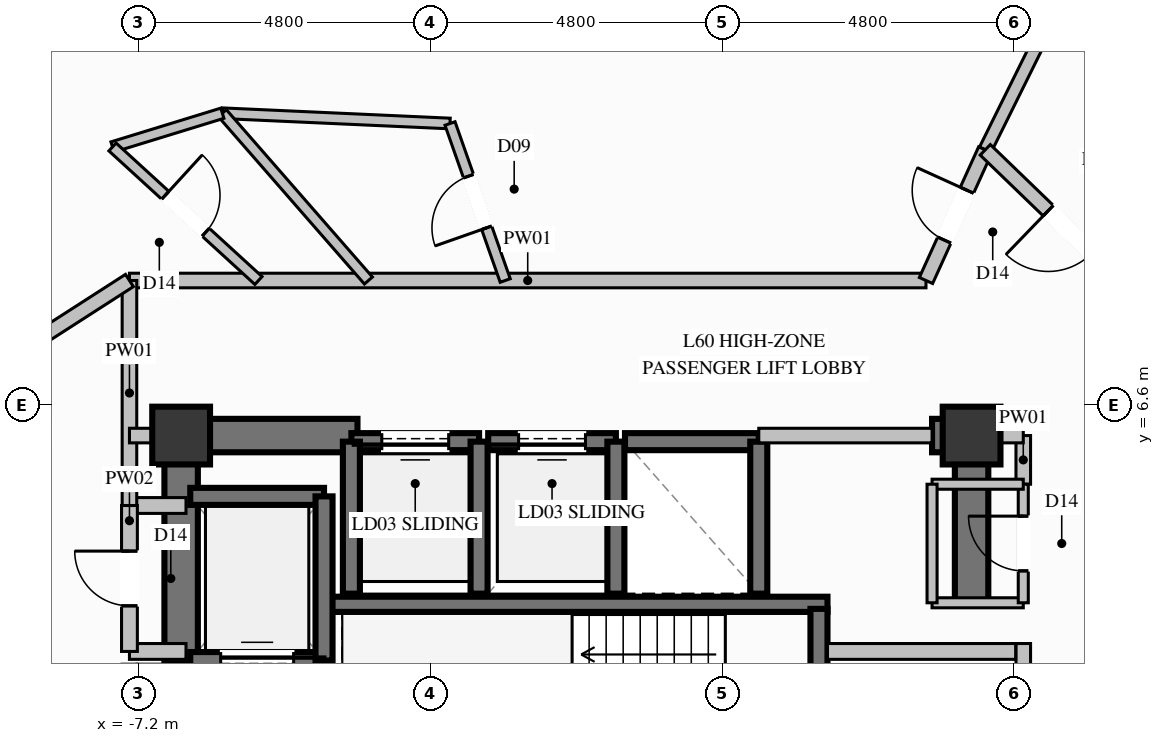
"""IFC4 building model, lengths in metres.
Left out: names, types, materials, properties, quantities, classifications, styles, units other than length and angle.
Written with IfcOpenShell. Run it as: python <this file> out.ifc"""

import sys

from ifc_helpers import new_model, si_unit, direction, frame, frame_2d, origin, origin_2d, place, context, subcontext, project, spatial, rectangle, extrude, element, fill, save


model = new_model("IFC4")
c1 = context("Model", 3, precision=1e-05, world=origin(), true_north=direction((0.0, 1.0)))
c2 = subcontext(c1, "Body", "Model", "MODEL_VIEW")
j1 = project(units=[si_unit("LENGTHUNIT", "METRE"), si_unit("PLANEANGLEUNIT", "RADIAN")], contexts=[c1])
p1 = place(None, origin())
s1 = spatial("IfcSite", under=j1, at=p1, CompositionType="ELEMENT")
p2 = place(p1, origin())
s2 = spatial("IfcBuilding", under=s1, at=p2, CompositionType="ELEMENT")
p3 = place(p2, frame((0.0, 0.0, 230.8)))
s3 = spatial("IfcBuildingStorey", under=s2, at=p3, CompositionType="ELEMENT", Elevation=230.8)
for number, where, z_axis, x_axis in (
    (1, (6.5, 6.1, 0.0), (0.0, 0.0, 1.0), (1.0, 0.0, 0.0)),
    (2, (-6.5, 6.1, 0.0), (0.0, 0.0, 1.0), (1.0, 0.0, 0.0)),
):
    element("IfcColumn", number, at=place(p3, frame(where, z_axis=z_axis, x_axis=x_axis)), inside=s3, PredefinedType="COLUMN", context=c2, shape_type="SweptSolid", body=[
        extrude(rectangle(XDim=0.95, YDim=0.95, at=origin_2d()), origin(), (0.0, 0.0, 1.0), 3.6),
    ])
p4 = place(p3, frame((-4.13, 3.325, 0.0), z_axis=(0.0, 0.0, 1.0), x_axis=(1.0, 0.0, 0.0)))
e3 = element("IfcWall", 3, at=p4, inside=s3, PredefinedType="SOLIDWALL", context=c2, shape_type="SweptSolid", body=[
    extrude(rectangle(XDim=8.26, YDim=0.25, at=frame_2d((4.13, 0.0))), origin(), (0.0, 0.0, 1.0), 3.6),
])
p5 = place(p3, frame((-6.225, 6.1, 0.0), z_axis=(0.0, 0.0, 1.0), x_axis=(1.0, 0.0, 0.0)))
e4 = element("IfcWall", 4, at=p5, inside=s3, PredefinedType="SHEAR", context=c2, shape_type="SweptSolid", body=[
    extrude(rectangle(XDim=2.625, YDim=0.55, at=frame_2d((1.312, 0.0))), origin(), (0.0, 0.0, 1.0), 3.6),
])
p6 = place(p3, frame((5.85, 6.1, 0.0), z_axis=(0.0, 0.0, 1.0), x_axis=(1.0, 0.0, 0.0)))
e5 = element("IfcWall", 5, at=p6, inside=s3, PredefinedType="SHEAR", context=c2, shape_type="SweptSolid", body=[
    extrude(rectangle(XDim=0.375, YDim=0.55, at=frame_2d((0.188, 0.0))), origin(), (0.0, 0.0, 1.0), 3.6),
])
p7 = place(p3, frame((-6.5, 2.35, 0.0), z_axis=(0.0, 0.0, 1.0), x_axis=(0.0, 1.0, 0.0)))
e6 = element("IfcWall", 6, at=p7, inside=s3, PredefinedType="SHEAR", context=c2, shape_type="SweptSolid", body=[
    extrude(rectangle(XDim=4.025, YDim=0.55, at=frame_2d((2.012, 0.0))), origin(), (0.0, 0.0, 1.0), 3.6),
])
p8 = place(p3, frame((6.5, 3.35, 0.0), z_axis=(0.0, 0.0, 1.0), x_axis=(0.0, 1.0, 0.0)))
e7 = element("IfcWall", 7, at=p8, inside=s3, PredefinedType="SHEAR", context=c2, shape_type="SweptSolid", body=[
    extrude(rectangle(XDim=3.025, YDim=0.55, at=frame_2d((1.512, 0.0))), origin(), (0.0, 0.0, 1.0), 3.6),
])
p9 = place(p3, frame((-1.6, 6.0, 0.0), z_axis=(0.0, 0.0, 1.0), x_axis=(-1.0, 0.0, 0.0)))
e8 = element("IfcWall", 8, at=p9, inside=s3, PredefinedType="SOLIDWALL", context=c2, shape_type="SweptSolid", body=[
    extrude(rectangle(XDim=2.1, YDim=0.28, at=frame_2d((1.05, 0.0))), origin(), (0.0, 0.0, 1.0), 3.2),
])
p10 = place(p9, frame((0.5, 0.0, 0.0)))
e9 = element("IfcOpeningElement", 9, at=p10, cuts=e8, PredefinedType="OPENING", context=c2, shape_type="SweptSolid", body=[
    extrude(rectangle(XDim=1.1, YDim=2.02, at=frame_2d((0.55, 1.01))), frame((0.0, 0.15, 0.0), z_axis=(0.0, -1.0, 0.0), x_axis=(1.0, 0.0, 0.0)), (0.0, 0.0, 1.0), 0.3),
])
for number, where, z_axis, x_axis in (
    (10, (-3.7, 6.0, 0.0), (0.0, 0.0, 1.0), (0.0, -1.0, 0.0)),
    (11, (-1.6, 3.5, 0.0), (0.0, 0.0, 1.0), (0.0, 1.0, 0.0)),
):
    element("IfcWall", number, at=place(p3, frame(where, z_axis=z_axis, x_axis=x_axis)), inside=s3, PredefinedType="SOLIDWALL", context=c2, shape_type="SweptSolid", body=[
        extrude(rectangle(XDim=2.5, YDim=0.28, at=frame_2d((1.25, 0.0))), origin(), (0.0, 0.0, 1.0), 3.2),
    ])
p11 = place(p3, frame((0.65, 6.0, 0.0), z_axis=(0.0, 0.0, 1.0), x_axis=(-1.0, 0.0, 0.0)))
e12 = element("IfcWall", 12, at=p11, inside=s3, PredefinedType="SOLIDWALL", context=c2, shape_type="SweptSolid", body=[
    extrude(rectangle(XDim=2.1, YDim=0.28, at=frame_2d((1.05, 0.0))), origin(), (0.0, 0.0, 1.0), 3.2),
])
p12 = place(p11, frame((0.5, 0.0, 0.0)))
e13 = element("IfcOpeningElement", 13, at=p12, cuts=e12, PredefinedType="OPENING", context=c2, shape_type="SweptSolid", body=[
    extrude(rectangle(XDim=1.1, YDim=2.02, at=frame_2d((0.55, 1.01))), frame((0.0, 0.15, 0.0), z_axis=(0.0, -1.0, 0.0), x_axis=(1.0, 0.0, 0.0)), (0.0, 0.0, 1.0), 0.3),
])
p13 = place(p3, frame((0.65, 3.5, 0.0), z_axis=(0.0, 0.0, 1.0), x_axis=(0.0, 1.0, 0.0)))
e14 = element("IfcWall", 14, at=p13, inside=s3, PredefinedType="SOLIDWALL", context=c2, shape_type="SweptSolid", body=[
    extrude(rectangle(XDim=2.5, YDim=0.28, at=frame_2d((1.25, 0.0))), origin(), (0.0, 0.0, 1.0), 3.2),
])
p14 = place(p3, frame((3.0, 6.0, 0.0), z_axis=(0.0, 0.0, 1.0), x_axis=(-1.0, 0.0, 0.0)))
e15 = element("IfcWall", 15, at=p14, inside=s3, PredefinedType="SOLIDWALL", context=c2, shape_type="SweptSolid", body=[
    extrude(rectangle(XDim=2.2, YDim=0.28, at=frame_2d((1.1, 0.0))), origin(), (0.0, 0.0, 1.0), 3.2),
])
p15 = place(p3, frame((3.0, 3.5, 0.0), z_axis=(0.0, 0.0, 1.0), x_axis=(0.0, 1.0, 0.0)))
e16 = element("IfcWall", 16, at=p15, inside=s3, PredefinedType="SOLIDWALL", context=c2, shape_type="SweptSolid", body=[
    extrude(rectangle(XDim=2.5, YDim=0.28, at=frame_2d((1.25, 0.0))), origin(), (0.0, 0.0, 1.0), 3.2),
])
p16 = place(p3, frame((-6.35, 2.4, 0.0), z_axis=(0.0, 0.0, 1.0), x_axis=(1.0, 0.0, 0.0)))
e17 = element("IfcWall", 17, at=p16, inside=s3, PredefinedType="SOLIDWALL", context=c2, shape_type="SweptSolid", body=[
    extrude(rectangle(XDim=2.2, YDim=0.28, at=frame_2d((1.1, 0.0))), origin(), (0.0, 0.0, 1.0), 3.2),
])
p17 = place(p16, frame((0.5, 0.0, 0.0)))
e18 = element("IfcOpeningElement", 18, at=p17, cuts=e17, PredefinedType="OPENING", context=c2, shape_type="SweptSolid", body=[
    extrude(rectangle(XDim=1.2, YDim=2.2, at=frame_2d((0.6, 1.1))), frame((0.0, 0.15, 0.0), z_axis=(0.0, -1.0, 0.0), x_axis=(1.0, 0.0, 0.0)), (0.0, 0.0, 1.0), 0.3),
])
p18 = place(p3, frame((-4.15, 5.1, 0.0), z_axis=(0.0, 0.0, 1.0), x_axis=(-1.0, 0.0, 0.0)))
e19 = element("IfcWall", 19, at=p18, inside=s3, PredefinedType="SOLIDWALL", context=c2, shape_type="SweptSolid", body=[
    extrude(rectangle(XDim=2.2, YDim=0.28, at=frame_2d((1.1, 0.0))), origin(), (0.0, 0.0, 1.0), 3.2),
])
p19 = place(p3, frame((-4.15, 2.4, 0.0), z_axis=(0.0, 0.0, 1.0), x_axis=(0.0, 1.0, 0.0)))
e20 = element("IfcWall", 20, at=p19, inside=s3, PredefinedType="SOLIDWALL", context=c2, shape_type="SweptSolid", body=[
    extrude(rectangle(XDim=2.7, YDim=0.28, at=frame_2d((1.35, 0.0))), origin(), (0.0, 0.0, 1.0), 3.2),
])
p20 = place(p3, frame((3.99, -2.21, 0.0), z_axis=(0.0, 0.0, 1.0), x_axis=(0.0, 1.0, 0.0)))
e21 = element("IfcWall", 21, at=p20, inside=s3, PredefinedType="SOLIDWALL", context=c2, shape_type="SweptSolid", body=[
    extrude(rectangle(XDim=5.46, YDim=0.28, at=frame_2d((2.73, 0.0))), origin(), (0.0, 0.0, 1.0), 3.2),
])
p21 = place(p20, frame((3.323, 0.0, 0.0)))
e22 = element("IfcOpeningElement", 22, at=p21, cuts=e21, PredefinedType="OPENING", context=c2, shape_type="SweptSolid", body=[
    extrude(rectangle(XDim=1.2, YDim=2.2, at=frame_2d((0.6, 1.1))), frame((0.0, 0.15, 0.0), z_axis=(0.0, -1.0, 0.0), x_axis=(1.0, 0.0, 0.0)), (0.0, 0.0, 1.0), 0.3),
])
p22 = place(p3, frame((7.35, -2.34, 0.0), z_axis=(0.0, 0.0, 1.0), x_axis=(0.0, 1.0, 0.0)))
e23 = element("IfcWall", 23, at=p22, inside=s3, PredefinedType="PARTITIONING", context=c2, shape_type="SweptSolid", body=[
    extrude(rectangle(XDim=5.02, YDim=0.24, at=frame_2d((2.51, 0.0))), origin(), (0.0, 0.0, 1.0), 3.2),
])
p23 = place(p22, frame((2.678, 0.0, 0.0)))
e24 = element("IfcOpeningElement", 24, at=p23, cuts=e23, PredefinedType="OPENING", context=c2, shape_type="SweptSolid", body=[
    extrude(rectangle(XDim=0.9, YDim=2.02, at=frame_2d((0.45, 1.01))), frame((0.0, 0.13, 0.0), z_axis=(0.0, -1.0, 0.0), x_axis=(1.0, 0.0, 0.0)), (0.0, 0.0, 1.0), 0.26),
])
p24 = place(p3, frame((4.13, 2.55, 0.0), z_axis=(0.0, 0.0, 1.0), x_axis=(1.0, 0.0, 0.0)))
e25 = element("IfcWall", 25, at=p24, inside=s3, PredefinedType="PARTITIONING", context=c2, shape_type="SweptSolid", body=[
    extrude(rectangle(XDim=3.095, YDim=0.26, at=frame_2d((1.548, 0.0))), origin(), (0.0, 0.0, 1.0), 3.2),
])
for number, where, z_axis, x_axis in (
    (26, (-7.35, 4.95, 0.0), (0.0, 0.0, 1.0), (1.0, 0.0, 0.0)),
    (27, (-7.35, 2.55, 0.0), (0.0, 0.0, 1.0), (1.0, 0.0, 0.0)),
):
    element("IfcWall", number, at=place(p3, frame(where, z_axis=z_axis, x_axis=x_axis)), inside=s3, PredefinedType="PARTITIONING", context=c2, shape_type="SweptSolid", body=[
        extrude(rectangle(XDim=0.93, YDim=0.26, at=frame_2d((0.465, 0.0))), origin(), (0.0, 0.0, 1.0), 3.2),
    ])
p25 = place(p3, frame((-7.35, 2.55, 0.0), z_axis=(0.0, 0.0, 1.0), x_axis=(0.0, 1.0, 0.0)))
e28 = element("IfcWall", 28, at=p25, inside=s3, PredefinedType="PARTITIONING", context=c2, shape_type="SweptSolid", body=[
    extrude(rectangle(XDim=2.4, YDim=0.26, at=frame_2d((1.2, 0.0))), origin(), (0.0, 0.0, 1.0), 3.2),
])
p26 = place(p25, frame((0.75, 0.0, 0.0)))
e29 = element("IfcOpeningElement", 29, at=p26, cuts=e28, PredefinedType="OPENING", context=c2, shape_type="SweptSolid", body=[
    extrude(rectangle(XDim=0.9, YDim=2.02, at=frame_2d((0.45, 1.01))), frame((0.0, 0.14, 0.0), z_axis=(0.0, -1.0, 0.0), x_axis=(1.0, 0.0, 0.0)), (0.0, 0.0, 1.0), 0.28),
])
p27 = place(p3, frame((-7.35, 8.65, 0.0), z_axis=(0.0, 0.0, 1.0), x_axis=(1.0, 0.0, 0.0)))
e30 = element("IfcWall", 30, at=p27, inside=s3, PredefinedType="PARTITIONING", context=c2, shape_type="SweptSolid", body=[
    extrude(rectangle(XDim=13.1, YDim=0.24, at=frame_2d((6.55, 0.0))), origin(), (0.0, 0.0, 1.0), 3.2),
])
p28 = place(p3, frame((3.0, 6.1, 0.0), z_axis=(0.0, 0.0, 1.0), x_axis=(1.0, 0.0, 0.0)))
e31 = element("IfcWall", 31, at=p28, inside=s3, PredefinedType="PARTITIONING", context=c2, shape_type="SweptSolid", body=[
    extrude(rectangle(XDim=2.85, YDim=0.24, at=frame_2d((1.425, 0.0))), origin(), (0.0, 0.0, 1.0), 2.067),
])
p29 = place(p3, frame((7.35, 5.3, 0.0), z_axis=(0.0, 0.0, 1.0), x_axis=(0.0, 1.0, 0.0)))
e32 = element("IfcWall", 32, at=p29, inside=s3, PredefinedType="PARTITIONING", context=c2, shape_type="SweptSolid", body=[
    extrude(rectangle(XDim=0.8, YDim=0.24, at=frame_2d((0.4, 0.0))), origin(), (0.0, 0.0, 1.0), 3.2),
])
p30 = place(p3, frame((6.5, 6.1, 0.0), z_axis=(0.0, 0.0, 1.0), x_axis=(1.0, 0.0, 0.0)))
e33 = element("IfcWall", 33, at=p30, inside=s3, PredefinedType="PARTITIONING", context=c2, shape_type="SweptSolid", body=[
    extrude(rectangle(XDim=0.85, YDim=0.24, at=frame_2d((0.425, 0.0))), origin(), (0.0, 0.0, 1.0), 3.2),
])
p31 = place(p3, frame((-7.35, 4.95, 0.0), z_axis=(0.0, 0.0, 1.0), x_axis=(0.0, 1.0, 0.0)))
e34 = element("IfcWall", 34, at=p31, inside=s3, PredefinedType="PARTITIONING", context=c2, shape_type="SweptSolid", body=[
    extrude(rectangle(XDim=3.7, YDim=0.24, at=frame_2d((1.85, 0.0))), origin(), (0.0, 0.0, 1.0), 3.2),
])
p32 = place(p3, frame((-7.35, 6.1, 0.0), z_axis=(0.0, 0.0, 1.0), x_axis=(1.0, 0.0, 0.0)))
e35 = element("IfcWall", 35, at=p32, inside=s3, PredefinedType="PARTITIONING", context=c2, shape_type="SweptSolid", body=[
    extrude(rectangle(XDim=0.85, YDim=0.24, at=frame_2d((0.425, 0.0))), origin(), (0.0, 0.0, 1.0), 3.2),
])
p33 = place(p3, frame((5.85, 3.35, 0.0), z_axis=(0.0, 0.0, 1.0), x_axis=(1.0, 0.0, 0.0)))
e36 = element("IfcWall", 36, at=p33, inside=s3, PredefinedType="PARTITIONING", context=c2, shape_type="SweptSolid", body=[
    extrude(rectangle(XDim=1.5, YDim=0.165, at=frame_2d((0.75, 0.0))), origin(), (0.0, 0.0, 1.0), 3.2),
])
p34 = place(p3, frame((7.35, 3.35, 0.0), z_axis=(0.0, 0.0, 1.0), x_axis=(0.0, 1.0, 0.0)))
e37 = element("IfcWall", 37, at=p34, inside=s3, PredefinedType="PARTITIONING", context=c2, shape_type="SweptSolid", body=[
    extrude(rectangle(XDim=1.95, YDim=0.165, at=frame_2d((0.975, 0.0))), origin(), (0.0, 0.0, 1.0), 3.2),
])
p35 = place(p34, frame((0.525, 0.0, 0.0)))
e38 = element("IfcOpeningElement", 38, at=p35, cuts=e37, PredefinedType="OPENING", context=c2, shape_type="SweptSolid", body=[
    extrude(rectangle(XDim=0.9, YDim=2.02, at=frame_2d((0.45, 1.01))), frame((0.0, 0.093, 0.0), z_axis=(0.0, -1.0, 0.0), x_axis=(1.0, 0.0, 0.0)), (0.0, 0.0, 1.0), 0.185),
])
p36 = place(p3, frame((7.35, 5.3, 0.0), z_axis=(0.0, 0.0, 1.0), x_axis=(-1.0, 0.0, 0.0)))
e39 = element("IfcWall", 39, at=p36, inside=s3, PredefinedType="PARTITIONING", context=c2, shape_type="SweptSolid", body=[
    extrude(rectangle(XDim=1.5, YDim=0.165, at=frame_2d((0.75, 0.0))), origin(), (0.0, 0.0, 1.0), 3.2),
])
p37 = place(p3, frame((5.85, 5.3, 0.0), z_axis=(0.0, 0.0, 1.0), x_axis=(0.0, -1.0, 0.0)))
e40 = element("IfcWall", 40, at=p37, inside=s3, PredefinedType="PARTITIONING", context=c2, shape_type="SweptSolid", body=[
    extrude(rectangle(XDim=1.95, YDim=0.165, at=frame_2d((0.975, 0.0))), origin(), (0.0, 0.0, 1.0), 2.067),
])
p38 = place(p3, frame((6.725, 10.799, 0.0), z_axis=(0.0, 0.0, 1.0), x_axis=(0.443620421332, 0.896214774358, 0.0)))
e41 = element("IfcWall", 41, at=p38, inside=s3, PredefinedType="PARTITIONING", context=c2, shape_type="SweptSolid", body=[
    extrude(rectangle(XDim=2.693, YDim=0.21, at=frame_2d((1.347, 0.0))), origin(), (0.0, 0.0, 1.0), 2.067),
])
p39 = place(p3, frame((-5.822, 11.401, 0.0), z_axis=(0.0, 0.0, 1.0), x_axis=(0.99898352798, -0.045076721529, 0.0)))
e42 = element("IfcWall", 42, at=p39, inside=s3, PredefinedType="PLUMBINGWALL", context=c2, shape_type="SweptSolid", body=[
    extrude(rectangle(XDim=3.748, YDim=0.175, at=frame_2d((1.874, 0.0))), origin(), (0.0, 0.0, 1.0), 3.2),
])
p40 = place(p3, frame((-5.822, 11.401, 0.0), z_axis=(0.0, 0.0, 1.0), x_axis=(0.657728098428, -0.753255433793, 0.0)))
e43 = element("IfcWall", 43, at=p40, inside=s3, PredefinedType="PLUMBINGWALL", context=c2, shape_type="SweptSolid", body=[
    extrude(rectangle(XDim=3.652, YDim=0.175, at=frame_2d((1.826, 0.0))), origin(), (0.0, 0.0, 1.0), 2.067),
])
p41 = place(p3, frame((-1.17, 8.65, 0.0), z_axis=(0.0, 0.0, 1.0), x_axis=(-0.33173276109, 0.943373401798, 0.0)))
e44 = element("IfcWall", 44, at=p41, inside=s3, PredefinedType="PLUMBINGWALL", context=c2, shape_type="SweptSolid", body=[
    extrude(rectangle(XDim=2.737, YDim=0.175, at=frame_2d((1.369, 0.0))), origin(), (0.0, 0.0, 1.0), 3.2),
])
p42 = place(p41, frame((0.919, 0.0, 0.0)))
e45 = element("IfcOpeningElement", 45, at=p42, cuts=e44, PredefinedType="OPENING", context=c2, shape_type="SweptSolid", body=[
    extrude(rectangle(XDim=0.9, YDim=2.1, at=frame_2d((0.45, 1.05))), frame((0.0, 0.098, 0.0), z_axis=(0.0, -1.0, 0.0), x_axis=(1.0, 0.0, 0.0)), (0.0, 0.0, 1.0), 0.195),
])
p43 = place(p3, frame((5.75, 8.65, 0.0), z_axis=(0.0, 0.0, 1.0), x_axis=(0.413171528251, 0.910653220629, 0.0)))
e46 = element("IfcWall", 46, at=p43, inside=s3, PredefinedType="PARTITIONING", context=c2, shape_type="SweptSolid", body=[
    extrude(rectangle(XDim=2.36, YDim=0.24, at=frame_2d((1.18, 0.0))), origin(), (0.0, 0.0, 1.0), 2.067),
])
p44 = place(p43, frame((0.73, 0.0, 0.0)))
e47 = element("IfcOpeningElement", 47, at=p44, cuts=e46, PredefinedType="OPENING", context=c2, shape_type="SweptSolid", body=[
    extrude(rectangle(XDim=0.9, YDim=2.02, at=frame_2d((0.45, 1.01))), frame((0.0, 0.13, 0.0), z_axis=(0.0, -1.0, 0.0), x_axis=(1.0, 0.0, 0.0)), (0.0, 0.0, 1.0), 0.26),
])
p45 = place(p3, frame((-7.629, 10.846, 0.0), z_axis=(0.0, 0.0, 1.0), x_axis=(0.955932477138, 0.293586612692, 0.0)))
e48 = element("IfcWall", 48, at=p45, inside=s3, PredefinedType="PLUMBINGWALL", context=c2, shape_type="SweptSolid", body=[
    extrude(rectangle(XDim=1.89, YDim=0.175, at=frame_2d((0.945, 0.0))), origin(), (0.0, 0.0, 1.0), 3.2),
])
p46 = place(p3, frame((-7.629, 10.846, 0.0), z_axis=(0.0, 0.0, 1.0), x_axis=(0.737882530439, -0.674929160189, 0.0)))
e49 = element("IfcWall", 49, at=p46, inside=s3, PredefinedType="PLUMBINGWALL", context=c2, shape_type="SweptSolid", body=[
    extrude(rectangle(XDim=3.254, YDim=0.175, at=frame_2d((1.627, 0.0))), origin(), (0.0, 0.0, 1.0), 2.067),
])
p47 = place(p46, frame((1.177, 0.0, 0.0)))
e50 = element("IfcOpeningElement", 50, at=p47, cuts=e49, PredefinedType="OPENING", context=c2, shape_type="SweptSolid", body=[
    extrude(rectangle(XDim=0.9, YDim=2.02, at=frame_2d((0.45, 1.01))), frame((0.0, 0.098, 0.0), z_axis=(0.0, -1.0, 0.0), x_axis=(1.0, 0.0, 0.0)), (0.0, 0.0, 1.0), 0.195),
])
p48 = place(p3, frame((-11.238, 6.15, 0.0), z_axis=(0.0, 0.0, 1.0), x_axis=(0.841118406986, 0.540851019625, 0.0)))
e51 = element("IfcWall", 51, at=p48, inside=s3, PredefinedType="PARTITIONING", context=c2, shape_type="SweptSolid", body=[
    extrude(rectangle(XDim=4.622, YDim=0.24, at=frame_2d((2.311, 0.0))), origin(), (0.0, 0.0, 1.0), 3.2),
])
p49 = place(p48, frame((1.811, 0.0, 0.0)))
e52 = element("IfcOpeningElement", 52, at=p49, cuts=e51, PredefinedType="OPENING", context=c2, shape_type="SweptSolid", body=[
    extrude(rectangle(XDim=1.0, YDim=2.2, at=frame_2d((0.5, 1.1))), frame((0.0, 0.13, 0.0), z_axis=(0.0, -1.0, 0.0), x_axis=(1.0, 0.0, 0.0)), (0.0, 0.0, 1.0), 0.26),
])
p50 = place(p3, frame((9.517, 8.103, 0.0), z_axis=(0.0, 0.0, 1.0), x_axis=(-0.719359188441, 0.694638292931, 0.0)))
e53 = element("IfcWall", 53, at=p50, inside=s3, PredefinedType="PARTITIONING", context=c2, shape_type="SweptSolid", body=[
    extrude(rectangle(XDim=3.881, YDim=0.24, at=frame_2d((1.94, 0.0))), origin(), (0.0, 0.0, 1.0), 3.2),
])
p51 = place(p50, frame((1.441, 0.0, 0.0)))
e54 = element("IfcOpeningElement", 54, at=p51, cuts=e53, PredefinedType="OPENING", context=c2, shape_type="SweptSolid", body=[
    extrude(rectangle(XDim=1.0, YDim=2.2, at=frame_2d((0.5, 1.1))), frame((0.0, 0.13, 0.0), z_axis=(0.0, -1.0, 0.0), x_axis=(1.0, 0.0, 0.0)), (0.0, 0.0, 1.0), 0.26),
])
p52 = place(p10, origin())
e55 = element("IfcDoor", 55, at=p52, inside=s3, OperationType="SLIDING_TO_LEFT", PredefinedType="DOOR", context=c2, shape_type="SweptSolid", body=[
    extrude(rectangle(XDim=1.1, YDim=2.02, at=frame_2d((0.55, 1.01))), frame((0.0, 0.025, 0.0), z_axis=(0.0, -1.0, 0.0), x_axis=(1.0, 0.0, 0.0)), (0.0, 0.0, 1.0), 0.05),
])
fill(e9, e55)
p53 = place(p12, origin())
e56 = element("IfcDoor", 56, at=p53, inside=s3, OperationType="SLIDING_TO_LEFT", PredefinedType="DOOR", context=c2, shape_type="SweptSolid", body=[
    extrude(rectangle(XDim=1.1, YDim=2.02, at=frame_2d((0.55, 1.01))), frame((0.0, 0.025, 0.0), z_axis=(0.0, -1.0, 0.0), x_axis=(1.0, 0.0, 0.0)), (0.0, 0.0, 1.0), 0.05),
])
fill(e13, e56)
p54 = place(p17, origin())
e57 = element("IfcDoor", 57, at=p54, inside=s3, OperationType="SLIDING_TO_LEFT", PredefinedType="DOOR", context=c2, shape_type="SweptSolid", body=[
    extrude(rectangle(XDim=1.2, YDim=2.2, at=frame_2d((0.6, 1.1))), frame((0.0, 0.025, 0.0), z_axis=(0.0, -1.0, 0.0), x_axis=(1.0, 0.0, 0.0)), (0.0, 0.0, 1.0), 0.05),
])
fill(e18, e57)
p55 = place(p26, origin())
e58 = element("IfcDoor", 58, at=p55, inside=s3, OperationType="SINGLE_SWING_RIGHT", PredefinedType="DOOR", context=c2, shape_type="SweptSolid", body=[
    extrude(rectangle(XDim=0.9, YDim=2.02, at=frame_2d((0.45, 1.01))), frame((0.0, 0.025, 0.0), z_axis=(0.0, -1.0, 0.0), x_axis=(1.0, 0.0, 0.0)), (0.0, 0.0, 1.0), 0.05),
])
fill(e29, e58)
p56 = place(p35, origin())
e59 = element("IfcDoor", 59, at=p56, inside=s3, OperationType="SINGLE_SWING_RIGHT", PredefinedType="DOOR", context=c2, shape_type="SweptSolid", body=[
    extrude(rectangle(XDim=0.9, YDim=2.02, at=frame_2d((0.45, 1.01))), frame((0.0, 0.025, 0.0), z_axis=(0.0, -1.0, 0.0), x_axis=(1.0, 0.0, 0.0)), (0.0, 0.0, 1.0), 0.05),
])
fill(e38, e59)
p57 = place(p42, origin())
e60 = element("IfcDoor", 60, at=p57, inside=s3, OperationType="SINGLE_SWING_LEFT", PredefinedType="DOOR", context=c2, shape_type="SweptSolid", body=[
    extrude(rectangle(XDim=0.9, YDim=2.1, at=frame_2d((0.45, 1.05))), frame((0.0, 0.025, 0.0), z_axis=(0.0, -1.0, 0.0), x_axis=(1.0, 0.0, 0.0)), (0.0, 0.0, 1.0), 0.05),
])
fill(e45, e60)
p58 = place(p44, origin())
e61 = element("IfcDoor", 61, at=p58, inside=s3, OperationType="SINGLE_SWING_RIGHT", PredefinedType="DOOR", context=c2, shape_type="SweptSolid", body=[
    extrude(rectangle(XDim=0.9, YDim=2.02, at=frame_2d((0.45, 1.01))), frame((0.0, 0.025, 0.0), z_axis=(0.0, -1.0, 0.0), x_axis=(1.0, 0.0, 0.0)), (0.0, 0.0, 1.0), 0.05),
])
fill(e47, e61)
p59 = place(p47, origin())
e62 = element("IfcDoor", 62, at=p59, inside=s3, OperationType="SINGLE_SWING_LEFT", PredefinedType="DOOR", context=c2, shape_type="SweptSolid", body=[
    extrude(rectangle(XDim=0.9, YDim=2.02, at=frame_2d((0.45, 1.01))), frame((0.0, 0.025, 0.0), z_axis=(0.0, -1.0, 0.0), x_axis=(1.0, 0.0, 0.0)), (0.0, 0.0, 1.0), 0.05),
])
fill(e50, e62)
p60 = place(p51, origin())
e63 = element("IfcDoor", 63, at=p60, inside=s3, OperationType="SINGLE_SWING_RIGHT", PredefinedType="DOOR", context=c2, shape_type="SweptSolid", body=[
    extrude(rectangle(XDim=1.0, YDim=2.2, at=frame_2d((0.5, 1.1))), frame((0.0, 0.025, 0.0), z_axis=(0.0, -1.0, 0.0), x_axis=(1.0, 0.0, 0.0)), (0.0, 0.0, 1.0), 0.05),
])
fill(e54, e63)
save(model, sys.argv[1])
